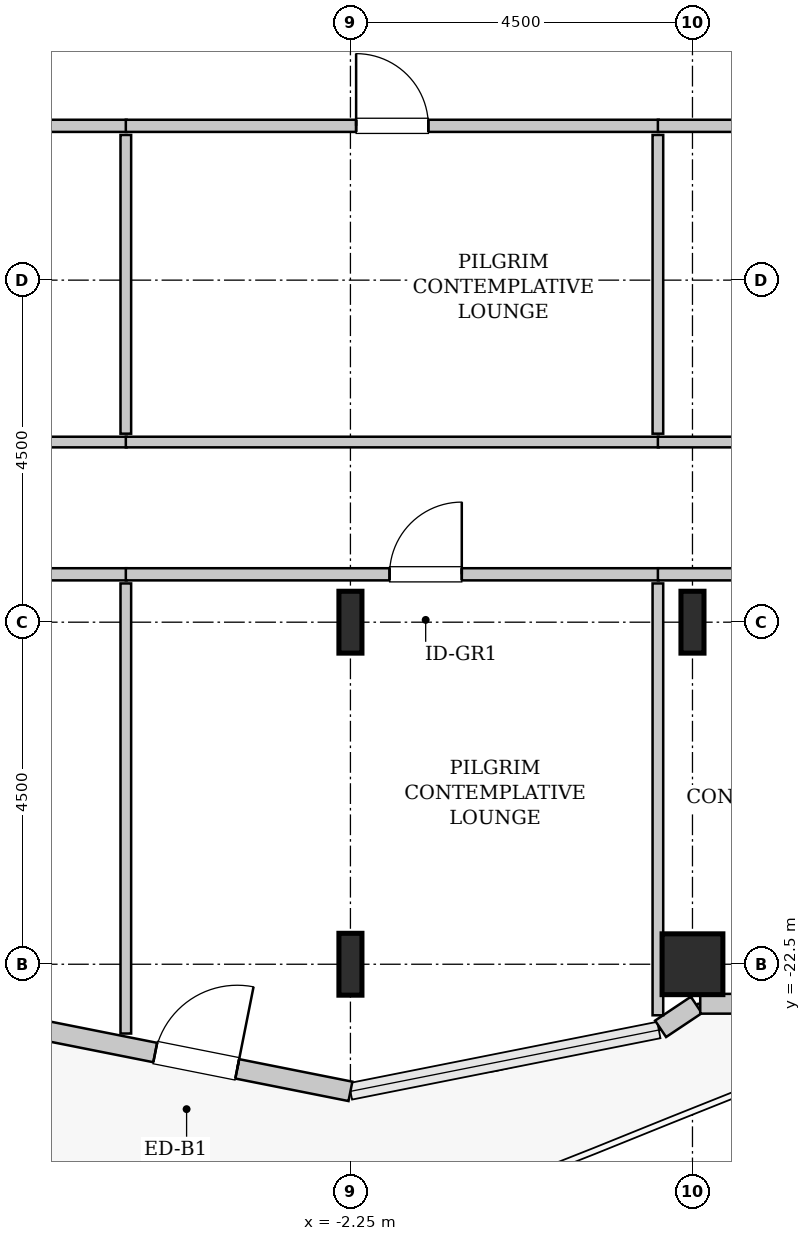
"""IFC4 building model, lengths in metres.
Left out: names, types, materials, properties, quantities, classifications, styles, units other than length and angle.
Written with IfcOpenShell. Run it as: python <this file> out.ifc"""

import sys

from ifc_helpers import new_model, si_unit, direction, frame, frame_2d, origin, origin_2d, place, context, subcontext, project, spatial, rectangle, hollow_rectangle, i_section, extrude, source, transform, mapped, element, fill, save


model = new_model("IFC4")
c1 = context("Model", 3, precision=1e-05, world=origin(), true_north=direction((0.0, 1.0)))
c2 = subcontext(c1, "Body", "Model", "MODEL_VIEW")
j1 = project(units=[si_unit("LENGTHUNIT", "METRE"), si_unit("PLANEANGLEUNIT", "RADIAN")], contexts=[c1])
p1 = place(None, origin())
s1 = spatial("IfcSite", under=j1, at=p1, CompositionType="ELEMENT")
p2 = place(p1, origin())
s2 = spatial("IfcBuilding", under=s1, at=p2, CompositionType="ELEMENT")
p3 = place(p2, frame((0.0, 0.0, 171.6)))
s3 = spatial("IfcBuildingStorey", under=s2, at=p3, CompositionType="ELEMENT", Elevation=171.6)
m1 = source(origin(), c2, "Body", "SweptSolid", [
    extrude(i_section(OverallWidth=0.303, OverallDepth=0.814, WebThickness=0.021, FlangeThickness=0.04, FilletRadius=0.03, at=origin_2d()), origin(), (0.0, 0.0, 1.0), 3.8),
])
for number, where, z_axis, x_axis in (
    (1, (-2.25, -22.5, 0.0), (0.0, 0.0, 1.0), (1.0, 0.0, 0.0)),
    (2, (-2.25, -18.0, 0.0), (0.0, 0.0, 1.0), (1.0, 0.0, 0.0)),
):
    element("IfcColumn", number, at=place(p3, frame(where, z_axis=z_axis, x_axis=x_axis)), inside=s3, PredefinedType="COLUMN", context=c2, shape_type="MappedRepresentation", body=[
        mapped(m1, transform((0.0, 0.0, 0.0), x_axis=(1.0, 0.0, 0.0), y_axis=(0.0, 1.0, 0.0), z_axis=(0.0, 0.0, 1.0), scale=1.0)),
    ])
m2 = source(origin(), c2, "Body", "SweptSolid", [
    extrude(hollow_rectangle(XDim=0.8, YDim=0.8, WallThickness=0.04, InnerFilletRadius=0.04, OuterFilletRadius=0.08, at=origin_2d()), origin(), (0.0, 0.0, 1.0), 3.8),
])
p4 = place(p3, frame((2.25, -22.5, 0.0), z_axis=(0.0, 0.0, 1.0), x_axis=(1.0, 0.0, 0.0)))
e3 = element("IfcColumn", 3, at=p4, inside=s3, PredefinedType="COLUMN", context=c2, shape_type="MappedRepresentation", body=[
    mapped(m2, transform((0.0, 0.0, 0.0), x_axis=(1.0, 0.0, 0.0), y_axis=(0.0, 1.0, 0.0), z_axis=(0.0, 0.0, 1.0), scale=1.0)),
])
p5 = place(p3, frame((2.25, -18.0, 0.0), z_axis=(0.0, 0.0, 1.0), x_axis=(1.0, 0.0, 0.0)))
e4 = element("IfcColumn", 4, at=p5, inside=s3, PredefinedType="COLUMN", context=c2, shape_type="MappedRepresentation", body=[
    mapped(m1, transform((0.0, 0.0, 0.0), x_axis=(1.0, 0.0, 0.0), y_axis=(0.0, 1.0, 0.0), z_axis=(0.0, 0.0, 1.0), scale=1.0)),
])
m3 = source(origin(), c2, "Body", "SweptSolid", [
    extrude(rectangle(XDim=4.137, YDim=0.26, at=frame_2d((2.068, 0.0))), origin(), (0.0, 0.0, 1.0), 3.55),
])
p6 = place(p3, frame((-6.307, -23.365, 0.0), z_axis=(0.0, 0.0, 1.0), x_axis=(0.980782170794, -0.195105954428, 0.0)))
e5 = element("IfcWall", 5, at=p6, inside=s3, PredefinedType="SOLIDWALL", context=c2, shape_type="MappedRepresentation", body=[
    mapped(m3, transform((0.0, 0.0, 0.0), x_axis=(1.0, 0.0, 0.0), y_axis=(0.0, 1.0, 0.0), z_axis=(0.0, 0.0, 1.0), scale=1.0)),
])
p7 = place(p6, frame((1.518, 0.0, 0.0)))
e6 = element("IfcOpeningElement", 6, at=p7, cuts=e5, PredefinedType="OPENING", context=c2, shape_type="SweptSolid", body=[
    extrude(rectangle(XDim=1.1, YDim=2.2, at=frame_2d((0.55, 1.1))), frame((0.0, 0.14, 0.0), z_axis=(0.0, -1.0, 0.0), x_axis=(1.0, 0.0, 0.0)), (0.0, 0.0, 1.0), 0.28),
])
m4 = source(origin(), c2, "Body", "SweptSolid", [
    extrude(rectangle(XDim=0.565, YDim=0.26, at=frame_2d((0.283, 0.0))), origin(), (0.0, 0.0, 1.0), 3.55),
])
p8 = place(p3, frame((1.831, -23.35, 0.0), z_axis=(0.0, 0.0, 1.0), x_axis=(0.831651492666, 0.555297933317, 0.0)))
e7 = element("IfcWall", 7, at=p8, inside=s3, PredefinedType="SOLIDWALL", context=c2, shape_type="MappedRepresentation", body=[
    mapped(m4, transform((0.0, 0.0, 0.0), x_axis=(1.0, 0.0, 0.0), y_axis=(0.0, 1.0, 0.0), z_axis=(0.0, 0.0, 1.0), scale=1.0)),
])
m5 = source(origin(), c2, "Body", "SweptSolid", [
    extrude(rectangle(XDim=1.37, YDim=0.26, at=frame_2d((0.685, 0.0))), origin(), (0.0, 0.0, 1.0), 3.55),
])
p9 = place(p3, frame((2.352, -23.02, 0.0), z_axis=(0.0, 0.0, 1.0), x_axis=(1.0, 0.0, 0.0)))
e8 = element("IfcWall", 8, at=p9, inside=s3, PredefinedType="SOLIDWALL", context=c2, shape_type="MappedRepresentation", body=[
    mapped(m5, transform((0.0, 0.0, 0.0), x_axis=(1.0, 0.0, 0.0), y_axis=(0.0, 1.0, 0.0), z_axis=(0.0, 0.0, 1.0), scale=1.0)),
])
m6 = source(origin(), c2, "Body", "SweptSolid", [
    extrude(rectangle(XDim=4.61, YDim=0.16, at=frame_2d((2.305, 0.0))), origin(), (0.0, 0.0, 1.0), 3.535),
])
p10 = place(p3, frame((-9.805, -17.37, 0.0), z_axis=(0.0, 0.0, 1.0), x_axis=(1.0, 0.0, 0.0)))
e9 = element("IfcWall", 9, at=p10, inside=s3, PredefinedType="PARTITIONING", context=c2, shape_type="MappedRepresentation", body=[
    mapped(m6, transform((0.0, 0.0, 0.0), x_axis=(1.0, 0.0, 0.0), y_axis=(0.0, 1.0, 0.0), z_axis=(0.0, 0.0, 1.0), scale=1.0)),
])
p11 = place(p10, frame((1.582, 0.0, 0.0)))
e10 = element("IfcOpeningElement", 10, at=p11, cuts=e9, PredefinedType="OPENING", context=c2, shape_type="SweptSolid", body=[
    extrude(rectangle(XDim=0.95, YDim=2.1, at=frame_2d((0.475, 1.05))), frame((0.0, 0.09, 0.0), z_axis=(0.0, -1.0, 0.0), x_axis=(1.0, 0.0, 0.0)), (0.0, 0.0, 1.0), 0.18),
])
m7 = source(origin(), c2, "Body", "SweptSolid", [
    extrude(rectangle(XDim=5.922, YDim=0.14, at=frame_2d((2.961, 0.0))), origin(), (0.0, 0.0, 1.0), 3.535),
])
p12 = place(p3, frame((-5.205, -23.412, 0.0), z_axis=(0.0, 0.0, 1.0), x_axis=(0.0, 1.0, 0.0)))
e11 = element("IfcWall", 11, at=p12, inside=s3, PredefinedType="PARTITIONING", context=c2, shape_type="MappedRepresentation", body=[
    mapped(m7, transform((0.0, 0.0, 0.0), x_axis=(1.0, 0.0, 0.0), y_axis=(0.0, 1.0, 0.0), z_axis=(0.0, 0.0, 1.0), scale=1.0)),
])
m8 = source(origin(), c2, "Body", "SweptSolid", [
    extrude(rectangle(XDim=4.5, YDim=0.16, at=frame_2d((2.25, 0.0))), origin(), (0.0, 0.0, 1.0), 3.535),
])
p13 = place(p3, frame((-9.695, -11.47, 0.0), z_axis=(0.0, 0.0, 1.0), x_axis=(1.0, 0.0, 0.0)))
e12 = element("IfcWall", 12, at=p13, inside=s3, PredefinedType="PARTITIONING", context=c2, shape_type="MappedRepresentation", body=[
    mapped(m8, transform((0.0, 0.0, 0.0), x_axis=(1.0, 0.0, 0.0), y_axis=(0.0, 1.0, 0.0), z_axis=(0.0, 0.0, 1.0), scale=1.0)),
])
p14 = place(p13, frame((1.775, 0.0, 0.0)))
e13 = element("IfcOpeningElement", 13, at=p14, cuts=e12, PredefinedType="OPENING", context=c2, shape_type="SweptSolid", body=[
    extrude(rectangle(XDim=0.95, YDim=2.1, at=frame_2d((0.475, 1.05))), frame((0.0, 0.09, 0.0), z_axis=(0.0, -1.0, 0.0), x_axis=(1.0, 0.0, 0.0)), (0.0, 0.0, 1.0), 0.18),
])
m9 = source(origin(), c2, "Body", "SweptSolid", [
    extrude(rectangle(XDim=4.5, YDim=0.14, at=frame_2d((2.25, 0.0))), origin(), (0.0, 0.0, 1.0), 3.535),
])
p15 = place(p3, frame((-9.695, -15.63, 0.0), z_axis=(0.0, 0.0, 1.0), x_axis=(1.0, 0.0, 0.0)))
e14 = element("IfcWall", 14, at=p15, inside=s3, PredefinedType="PARTITIONING", context=c2, shape_type="MappedRepresentation", body=[
    mapped(m9, transform((0.0, 0.0, 0.0), x_axis=(1.0, 0.0, 0.0), y_axis=(0.0, 1.0, 0.0), z_axis=(0.0, 0.0, 1.0), scale=1.0)),
])
m10 = source(origin(), c2, "Body", "SweptSolid", [
    extrude(rectangle(XDim=3.93, YDim=0.14, at=frame_2d((1.965, 0.0))), origin(), (0.0, 0.0, 1.0), 3.535),
])
p16 = place(p3, frame((-5.205, -15.52, 0.0), z_axis=(0.0, 0.0, 1.0), x_axis=(0.0, 1.0, 0.0)))
e15 = element("IfcWall", 15, at=p16, inside=s3, PredefinedType="PARTITIONING", context=c2, shape_type="MappedRepresentation", body=[
    mapped(m10, transform((0.0, 0.0, 0.0), x_axis=(1.0, 0.0, 0.0), y_axis=(0.0, 1.0, 0.0), z_axis=(0.0, 0.0, 1.0), scale=1.0)),
])
m11 = source(origin(), c2, "Body", "SweptSolid", [
    extrude(rectangle(XDim=7.01, YDim=0.16, at=frame_2d((3.505, 0.0))), origin(), (0.0, 0.0, 1.0), 3.535),
])
p17 = place(p3, frame((-5.205, -17.37, 0.0), z_axis=(0.0, 0.0, 1.0), x_axis=(1.0, 0.0, 0.0)))
e16 = element("IfcWall", 16, at=p17, inside=s3, PredefinedType="PARTITIONING", context=c2, shape_type="MappedRepresentation", body=[
    mapped(m11, transform((0.0, 0.0, 0.0), x_axis=(1.0, 0.0, 0.0), y_axis=(0.0, 1.0, 0.0), z_axis=(0.0, 0.0, 1.0), scale=1.0)),
])
p18 = place(p17, frame((3.47, 0.0, 0.0)))
e17 = element("IfcOpeningElement", 17, at=p18, cuts=e16, PredefinedType="OPENING", context=c2, shape_type="SweptSolid", body=[
    extrude(rectangle(XDim=0.95, YDim=2.1, at=frame_2d((0.475, 1.05))), frame((0.0, 0.09, 0.0), z_axis=(0.0, -1.0, 0.0), x_axis=(1.0, 0.0, 0.0)), (0.0, 0.0, 1.0), 0.18),
])
m12 = source(origin(), c2, "Body", "SweptSolid", [
    extrude(rectangle(XDim=5.681, YDim=0.14, at=frame_2d((2.841, 0.0))), origin(), (0.0, 0.0, 1.0), 2.875),
])
p19 = place(p3, frame((1.795, -23.171, 0.0), z_axis=(0.0, 0.0, 1.0), x_axis=(0.0, 1.0, 0.0)))
e18 = element("IfcWall", 18, at=p19, inside=s3, PredefinedType="PARTITIONING", context=c2, shape_type="MappedRepresentation", body=[
    mapped(m12, transform((0.0, 0.0, 0.0), x_axis=(1.0, 0.0, 0.0), y_axis=(0.0, 1.0, 0.0), z_axis=(0.0, 0.0, 1.0), scale=1.0)),
])
p20 = place(p3, frame((-5.205, -11.47, 0.0), z_axis=(0.0, 0.0, 1.0), x_axis=(1.0, 0.0, 0.0)))
e19 = element("IfcWall", 19, at=p20, inside=s3, PredefinedType="PARTITIONING", context=c2, shape_type="MappedRepresentation", body=[
    mapped(m11, transform((0.0, 0.0, 0.0), x_axis=(1.0, 0.0, 0.0), y_axis=(0.0, 1.0, 0.0), z_axis=(0.0, 0.0, 1.0), scale=1.0)),
])
p21 = place(p20, frame((3.03, 0.0, 0.0)))
e20 = element("IfcOpeningElement", 20, at=p21, cuts=e19, PredefinedType="OPENING", context=c2, shape_type="SweptSolid", body=[
    extrude(rectangle(XDim=0.95, YDim=2.1, at=frame_2d((0.475, 1.05))), frame((0.0, 0.09, 0.0), z_axis=(0.0, -1.0, 0.0), x_axis=(1.0, 0.0, 0.0)), (0.0, 0.0, 1.0), 0.18),
])
m13 = source(origin(), c2, "Body", "SweptSolid", [
    extrude(rectangle(XDim=7.01, YDim=0.14, at=frame_2d((3.505, 0.0))), origin(), (0.0, 0.0, 1.0), 3.535),
])
p22 = place(p3, frame((-5.205, -15.63, 0.0), z_axis=(0.0, 0.0, 1.0), x_axis=(1.0, 0.0, 0.0)))
e21 = element("IfcWall", 21, at=p22, inside=s3, PredefinedType="PARTITIONING", context=c2, shape_type="MappedRepresentation", body=[
    mapped(m13, transform((0.0, 0.0, 0.0), x_axis=(1.0, 0.0, 0.0), y_axis=(0.0, 1.0, 0.0), z_axis=(0.0, 0.0, 1.0), scale=1.0)),
])
p23 = place(p3, frame((1.795, -15.52, 0.0), z_axis=(0.0, 0.0, 1.0), x_axis=(0.0, 1.0, 0.0)))
e22 = element("IfcWall", 22, at=p23, inside=s3, PredefinedType="PARTITIONING", context=c2, shape_type="MappedRepresentation", body=[
    mapped(m10, transform((0.0, 0.0, 0.0), x_axis=(1.0, 0.0, 0.0), y_axis=(0.0, 1.0, 0.0), z_axis=(0.0, 0.0, 1.0), scale=1.0)),
])
m14 = source(origin(), c2, "Body", "SweptSolid", [
    extrude(rectangle(XDim=6.01, YDim=0.16, at=frame_2d((3.005, 0.0))), origin(), (0.0, 0.0, 1.0), 3.535),
])
p24 = place(p3, frame((1.795, -17.37, 0.0), z_axis=(0.0, 0.0, 1.0), x_axis=(1.0, 0.0, 0.0)))
e23 = element("IfcWall", 23, at=p24, inside=s3, PredefinedType="PARTITIONING", context=c2, shape_type="MappedRepresentation", body=[
    mapped(m14, transform((0.0, 0.0, 0.0), x_axis=(1.0, 0.0, 0.0), y_axis=(0.0, 1.0, 0.0), z_axis=(0.0, 0.0, 1.0), scale=1.0)),
])
p25 = place(p24, frame((2.53, 0.0, 0.0)))
e24 = element("IfcOpeningElement", 24, at=p25, cuts=e23, PredefinedType="OPENING", context=c2, shape_type="SweptSolid", body=[
    extrude(rectangle(XDim=0.95, YDim=2.1, at=frame_2d((0.475, 1.05))), frame((0.0, 0.09, 0.0), z_axis=(0.0, -1.0, 0.0), x_axis=(1.0, 0.0, 0.0)), (0.0, 0.0, 1.0), 0.18),
])
p26 = place(p3, frame((1.795, -11.47, 0.0), z_axis=(0.0, 0.0, 1.0), x_axis=(1.0, 0.0, 0.0)))
e25 = element("IfcWall", 25, at=p26, inside=s3, PredefinedType="PARTITIONING", context=c2, shape_type="MappedRepresentation", body=[
    mapped(m14, transform((0.0, 0.0, 0.0), x_axis=(1.0, 0.0, 0.0), y_axis=(0.0, 1.0, 0.0), z_axis=(0.0, 0.0, 1.0), scale=1.0)),
])
p27 = place(p26, frame((2.53, 0.0, 0.0)))
e26 = element("IfcOpeningElement", 26, at=p27, cuts=e25, PredefinedType="OPENING", context=c2, shape_type="SweptSolid", body=[
    extrude(rectangle(XDim=0.95, YDim=2.1, at=frame_2d((0.475, 1.05))), frame((0.0, 0.09, 0.0), z_axis=(0.0, -1.0, 0.0), x_axis=(1.0, 0.0, 0.0)), (0.0, 0.0, 1.0), 0.18),
])
m15 = source(origin(), c2, "Body", "SweptSolid", [
    extrude(rectangle(XDim=6.01, YDim=0.14, at=frame_2d((3.005, 0.0))), origin(), (0.0, 0.0, 1.0), 3.535),
])
p28 = place(p3, frame((1.795, -15.63, 0.0), z_axis=(0.0, 0.0, 1.0), x_axis=(1.0, 0.0, 0.0)))
e27 = element("IfcWall", 27, at=p28, inside=s3, PredefinedType="PARTITIONING", context=c2, shape_type="MappedRepresentation", body=[
    mapped(m15, transform((0.0, 0.0, 0.0), x_axis=(1.0, 0.0, 0.0), y_axis=(0.0, 1.0, 0.0), z_axis=(0.0, 0.0, 1.0), scale=1.0)),
])
m16 = source(origin(), c2, "Body", "SweptSolid", [
    extrude(rectangle(XDim=1.1, YDim=2.2, at=frame_2d((0.55, 1.1))), frame((0.0, 0.025, 0.0), z_axis=(0.0, -1.0, 0.0), x_axis=(1.0, 0.0, 0.0)), (0.0, 0.0, 1.0), 0.05),
])
p29 = place(p7, origin())
e28 = element("IfcDoor", 28, at=p29, inside=s3, OperationType="SINGLE_SWING_RIGHT", PredefinedType="DOOR", context=c2, shape_type="MappedRepresentation", body=[
    mapped(m16, transform((0.0, 0.0, 0.0), x_axis=(1.0, 0.0, 0.0), y_axis=(0.0, 1.0, 0.0), z_axis=(0.0, 0.0, 1.0), scale=1.0)),
])
fill(e6, e28)
m17 = source(origin(), c2, "Body", "SweptSolid", [
    extrude(rectangle(XDim=0.95, YDim=2.1, at=frame_2d((0.475, 1.05))), frame((0.0, 0.025, 0.0), z_axis=(0.0, -1.0, 0.0), x_axis=(1.0, 0.0, 0.0)), (0.0, 0.0, 1.0), 0.05),
])
p30 = place(p18, origin())
e29 = element("IfcDoor", 29, at=p30, inside=s3, OperationType="SINGLE_SWING_RIGHT", PredefinedType="DOOR", context=c2, shape_type="MappedRepresentation", body=[
    mapped(m17, transform((0.0, 0.0, 0.0), x_axis=(1.0, 0.0, 0.0), y_axis=(0.0, 1.0, 0.0), z_axis=(0.0, 0.0, 1.0), scale=1.0)),
])
fill(e17, e29)
p31 = place(p21, origin())
e30 = element("IfcDoor", 30, at=p31, inside=s3, OperationType="SINGLE_SWING_LEFT", PredefinedType="DOOR", context=c2, shape_type="MappedRepresentation", body=[
    mapped(m17, transform((0.0, 0.0, 0.0), x_axis=(1.0, 0.0, 0.0), y_axis=(0.0, 1.0, 0.0), z_axis=(0.0, 0.0, 1.0), scale=1.0)),
])
fill(e20, e30)
save(model, sys.argv[1])
